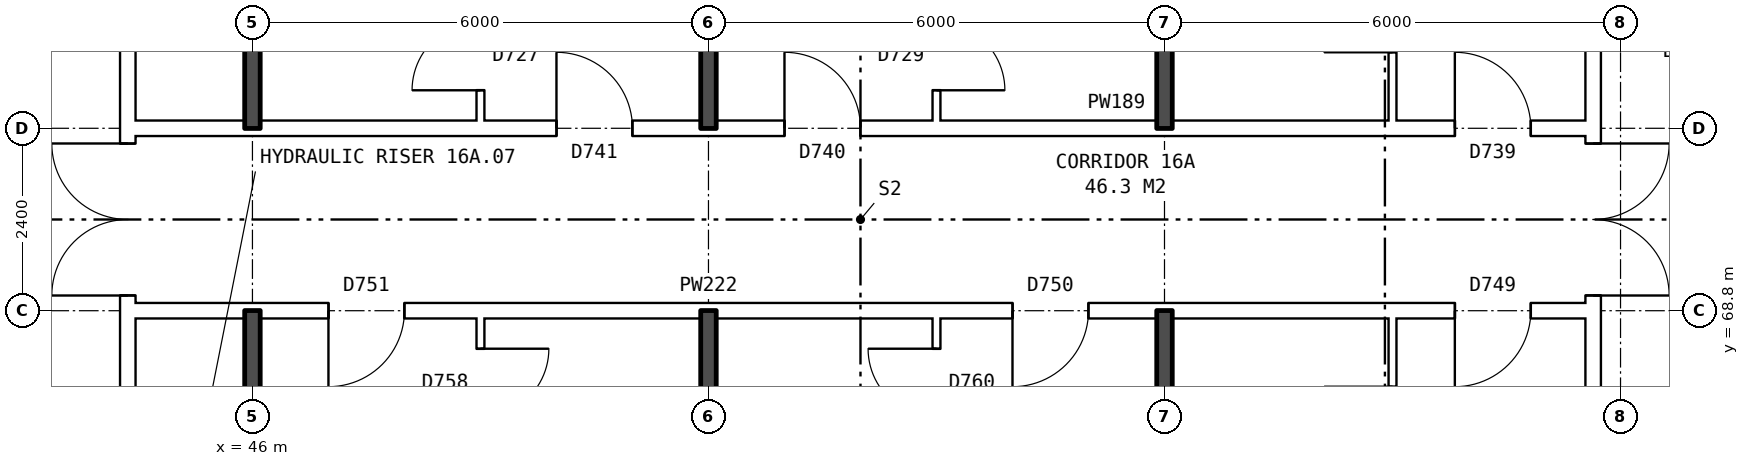
"""IFC4 building model, lengths in metres.
Left out: names, types, materials, properties, quantities, classifications, styles, units other than length and angle.
Written with IfcOpenShell. Run it as: python <this file> out.ifc"""

import sys

from ifc_helpers import new_model, si_unit, direction, frame, frame_2d, origin, place, context, subcontext, project, spatial, rectangle, extrude, element, fill, save


model = new_model("IFC4")
c1 = context("Model", 3, precision=1e-05, world=origin(), true_north=direction((0.0, 1.0)))
c2 = subcontext(c1, "Body", "Model", "MODEL_VIEW")
j1 = project(units=[si_unit("LENGTHUNIT", "METRE"), si_unit("PLANEANGLEUNIT", "RADIAN")], contexts=[c1])
p1 = place(None, origin())
s1 = spatial("IfcSite", under=j1, at=p1, CompositionType="ELEMENT")
p2 = place(p1, origin())
s2 = spatial("IfcBuilding", under=s1, at=p2, CompositionType="ELEMENT")
p3 = place(p2, frame((0.0, 0.0, 59.8)))
s3 = spatial("IfcBuildingStorey", under=s2, at=p3, CompositionType="ELEMENT", Elevation=59.8)
p4 = place(p3, frame((63.64, 63.9, 0.0), z_axis=(0.0, 0.0, 1.0), x_axis=(0.0, 1.0, 0.0)))
e1 = element("IfcWall", 1, at=p4, inside=s3, PredefinedType="PARTITIONING", context=c2, shape_type="SweptSolid", body=[
    extrude(rectangle(XDim=12.2, YDim=0.2, at=frame_2d((6.1, 0.0))), origin(), (0.0, 0.0, 1.0), 2.85),
])
p5 = place(p4, frame((5.1, 0.0, 0.0)))
e2 = element("IfcOpeningElement", 2, at=p5, cuts=e1, PredefinedType="OPENING", context=c2, shape_type="SweptSolid", body=[
    extrude(rectangle(XDim=2.0, YDim=2.1, at=frame_2d((1.0, 1.05))), frame((0.0, 0.11, 0.0), z_axis=(0.0, -1.0, 0.0), x_axis=(1.0, 0.0, 0.0)), (0.0, 0.0, 1.0), 0.22),
])
p6 = place(p3, frame((44.36, 63.9, 0.0), z_axis=(0.0, 0.0, 1.0), x_axis=(0.0, 1.0, 0.0)))
e3 = element("IfcWall", 3, at=p6, inside=s3, PredefinedType="PARTITIONING", context=c2, shape_type="SweptSolid", body=[
    extrude(rectangle(XDim=12.2, YDim=0.2, at=frame_2d((6.1, 0.0))), origin(), (0.0, 0.0, 1.0), 2.85),
])
p7 = place(p6, frame((5.1, 0.0, 0.0)))
e4 = element("IfcOpeningElement", 4, at=p7, cuts=e3, PredefinedType="OPENING", context=c2, shape_type="SweptSolid", body=[
    extrude(rectangle(XDim=2.0, YDim=2.1, at=frame_2d((1.0, 1.05))), frame((0.0, 0.11, 0.0), z_axis=(0.0, -1.0, 0.0), x_axis=(1.0, 0.0, 0.0)), (0.0, 0.0, 1.0), 0.22),
])
p8 = place(p3, frame((44.36, 68.8, 0.0), z_axis=(0.0, 0.0, 1.0), x_axis=(1.0, 0.0, 0.0)))
e5 = element("IfcWall", 5, at=p8, inside=s3, PredefinedType="PARTITIONING", context=c2, shape_type="SweptSolid", body=[
    extrude(rectangle(XDim=19.28, YDim=0.2, at=frame_2d((9.64, 0.0))), origin(), (0.0, 0.0, 1.0), 2.85),
])
p9 = place(p8, frame((17.46, 0.0, 0.0)))
e6 = element("IfcOpeningElement", 6, at=p9, cuts=e5, PredefinedType="OPENING", context=c2, shape_type="SweptSolid", body=[
    extrude(rectangle(XDim=1.0, YDim=2.1, at=frame_2d((0.5, 1.05))), frame((0.0, 0.11, 0.0), z_axis=(0.0, -1.0, 0.0), x_axis=(1.0, 0.0, 0.0)), (0.0, 0.0, 1.0), 0.22),
])
p10 = place(p8, frame((11.64, 0.0, 0.0)))
e7 = element("IfcOpeningElement", 7, at=p10, cuts=e5, PredefinedType="OPENING", context=c2, shape_type="SweptSolid", body=[
    extrude(rectangle(XDim=1.0, YDim=2.1, at=frame_2d((0.5, 1.05))), frame((0.0, 0.11, 0.0), z_axis=(0.0, -1.0, 0.0), x_axis=(1.0, 0.0, 0.0)), (0.0, 0.0, 1.0), 0.22),
])
p11 = place(p8, frame((2.64, 0.0, 0.0)))
e8 = element("IfcOpeningElement", 8, at=p11, cuts=e5, PredefinedType="OPENING", context=c2, shape_type="SweptSolid", body=[
    extrude(rectangle(XDim=1.0, YDim=2.1, at=frame_2d((0.5, 1.05))), frame((0.0, 0.11, 0.0), z_axis=(0.0, -1.0, 0.0), x_axis=(1.0, 0.0, 0.0)), (0.0, 0.0, 1.0), 0.22),
])
p12 = place(p3, frame((44.36, 71.2, 0.0), z_axis=(0.0, 0.0, 1.0), x_axis=(1.0, 0.0, 0.0)))
e9 = element("IfcWall", 9, at=p12, inside=s3, PredefinedType="PARTITIONING", context=c2, shape_type="SweptSolid", body=[
    extrude(rectangle(XDim=19.28, YDim=0.2, at=frame_2d((9.64, 0.0))), origin(), (0.0, 0.0, 1.0), 2.85),
])
p13 = place(p12, frame((17.46, 0.0, 0.0)))
e10 = element("IfcOpeningElement", 10, at=p13, cuts=e9, PredefinedType="OPENING", context=c2, shape_type="SweptSolid", body=[
    extrude(rectangle(XDim=1.0, YDim=2.1, at=frame_2d((0.5, 1.05))), frame((0.0, 0.11, 0.0), z_axis=(0.0, -1.0, 0.0), x_axis=(1.0, 0.0, 0.0)), (0.0, 0.0, 1.0), 0.22),
])
p14 = place(p12, frame((8.64, 0.0, 0.0)))
e11 = element("IfcOpeningElement", 11, at=p14, cuts=e9, PredefinedType="OPENING", context=c2, shape_type="SweptSolid", body=[
    extrude(rectangle(XDim=1.0, YDim=2.1, at=frame_2d((0.5, 1.05))), frame((0.0, 0.11, 0.0), z_axis=(0.0, -1.0, 0.0), x_axis=(1.0, 0.0, 0.0)), (0.0, 0.0, 1.0), 0.22),
])
p15 = place(p12, frame((5.64, 0.0, 0.0)))
e12 = element("IfcOpeningElement", 12, at=p15, cuts=e9, PredefinedType="OPENING", context=c2, shape_type="SweptSolid", body=[
    extrude(rectangle(XDim=1.0, YDim=2.1, at=frame_2d((0.5, 1.05))), frame((0.0, 0.11, 0.0), z_axis=(0.0, -1.0, 0.0), x_axis=(1.0, 0.0, 0.0)), (0.0, 0.0, 1.0), 0.22),
])
for number, where, z_axis, x_axis in (
    (13, (46.0, 63.8, 0.0), (0.0, 0.0, 1.0), (0.0, 1.0, 0.0)),
    (14, (46.0, 71.2, 0.0), (0.0, 0.0, 1.0), (0.0, 1.0, 0.0)),
):
    element("IfcWall", number, at=place(p3, frame(where, z_axis=z_axis, x_axis=x_axis)), inside=s3, PredefinedType="SOLIDWALL", context=c2, shape_type="SweptSolid", body=[
        extrude(rectangle(XDim=5.0, YDim=0.2, at=frame_2d((2.5, 0.0))), origin(), (0.0, 0.0, 1.0), 2.85),
    ])
p16 = place(p3, frame((49.0, 54.36, 0.0), z_axis=(0.0, 0.0, 1.0), x_axis=(0.0, 1.0, 0.0)))
e15 = element("IfcWall", 15, at=p16, inside=s3, PredefinedType="PARTITIONING", context=c2, shape_type="SweptSolid", body=[
    extrude(rectangle(XDim=14.34, YDim=0.1, at=frame_2d((7.17, 0.0))), origin(), (0.0, 0.0, 1.0), 2.85),
])
p17 = place(p16, frame((5.5, 0.0, 0.0)))
e16 = element("IfcOpeningElement", 16, at=p17, cuts=e15, PredefinedType="OPENING", context=c2, shape_type="SweptSolid", body=[
    extrude(rectangle(XDim=0.9, YDim=2.1, at=frame_2d((0.45, 1.05))), frame((0.0, 0.06, 0.0), z_axis=(0.0, -1.0, 0.0), x_axis=(1.0, 0.0, 0.0)), (0.0, 0.0, 1.0), 0.12),
])
p18 = place(p16, frame((13.04, 0.0, 0.0)))
e17 = element("IfcOpeningElement", 17, at=p18, cuts=e15, PredefinedType="OPENING", context=c2, shape_type="SweptSolid", body=[
    extrude(rectangle(XDim=0.9, YDim=2.1, at=frame_2d((0.45, 1.05))), frame((0.0, 0.06, 0.0), z_axis=(0.0, -1.0, 0.0), x_axis=(1.0, 0.0, 0.0)), (0.0, 0.0, 1.0), 0.12),
])
p19 = place(p3, frame((49.0, 71.3, 0.0), z_axis=(0.0, 0.0, 1.0), x_axis=(0.0, 1.0, 0.0)))
e18 = element("IfcWall", 18, at=p19, inside=s3, PredefinedType="PARTITIONING", context=c2, shape_type="SweptSolid", body=[
    extrude(rectangle(XDim=14.34, YDim=0.1, at=frame_2d((7.17, 0.0))), origin(), (0.0, 0.0, 1.0), 2.85),
])
p20 = place(p19, frame((6.74, 0.0, 0.0)))
e19 = element("IfcOpeningElement", 19, at=p20, cuts=e18, PredefinedType="OPENING", context=c2, shape_type="SweptSolid", body=[
    extrude(rectangle(XDim=0.9, YDim=2.1, at=frame_2d((0.45, 1.05))), frame((0.0, 0.06, 0.0), z_axis=(0.0, -1.0, 0.0), x_axis=(1.0, 0.0, 0.0)), (0.0, 0.0, 1.0), 0.12),
])
p21 = place(p19, frame((0.4, 0.0, 0.0)))
e20 = element("IfcOpeningElement", 20, at=p21, cuts=e18, PredefinedType="OPENING", context=c2, shape_type="SweptSolid", body=[
    extrude(rectangle(XDim=0.9, YDim=2.1, at=frame_2d((0.45, 1.05))), frame((0.0, 0.06, 0.0), z_axis=(0.0, -1.0, 0.0), x_axis=(1.0, 0.0, 0.0)), (0.0, 0.0, 1.0), 0.12),
])
for number, where, z_axis, x_axis in (
    (21, (52.0, 54.36, 0.0), (0.0, 0.0, 1.0), (0.0, 1.0, 0.0)),
    (22, (52.0, 71.2, 0.0), (0.0, 0.0, 1.0), (0.0, 1.0, 0.0)),
):
    element("IfcWall", number, at=place(p3, frame(where, z_axis=z_axis, x_axis=x_axis)), inside=s3, PredefinedType="SOLIDWALL", context=c2, shape_type="SweptSolid", body=[
        extrude(rectangle(XDim=14.44, YDim=0.2, at=frame_2d((7.22, 0.0))), origin(), (0.0, 0.0, 1.0), 2.85),
    ])
p22 = place(p3, frame((55.0, 54.36, 0.0), z_axis=(0.0, 0.0, 1.0), x_axis=(0.0, 1.0, 0.0)))
e23 = element("IfcWall", 23, at=p22, inside=s3, PredefinedType="PARTITIONING", context=c2, shape_type="SweptSolid", body=[
    extrude(rectangle(XDim=14.34, YDim=0.1, at=frame_2d((7.17, 0.0))), origin(), (0.0, 0.0, 1.0), 2.85),
])
p23 = place(p22, frame((7.7, 0.0, 0.0)))
e24 = element("IfcOpeningElement", 24, at=p23, cuts=e23, PredefinedType="OPENING", context=c2, shape_type="SweptSolid", body=[
    extrude(rectangle(XDim=0.9, YDim=2.1, at=frame_2d((0.45, 1.05))), frame((0.0, 0.06, 0.0), z_axis=(0.0, -1.0, 0.0), x_axis=(1.0, 0.0, 0.0)), (0.0, 0.0, 1.0), 0.12),
])
p24 = place(p22, frame((13.04, 0.0, 0.0)))
e25 = element("IfcOpeningElement", 25, at=p24, cuts=e23, PredefinedType="OPENING", context=c2, shape_type="SweptSolid", body=[
    extrude(rectangle(XDim=0.9, YDim=2.1, at=frame_2d((0.45, 1.05))), frame((0.0, 0.06, 0.0), z_axis=(0.0, -1.0, 0.0), x_axis=(1.0, 0.0, 0.0)), (0.0, 0.0, 1.0), 0.12),
])
p25 = place(p3, frame((55.0, 71.3, 0.0), z_axis=(0.0, 0.0, 1.0), x_axis=(0.0, 1.0, 0.0)))
e26 = element("IfcWall", 26, at=p25, inside=s3, PredefinedType="PARTITIONING", context=c2, shape_type="SweptSolid", body=[
    extrude(rectangle(XDim=14.34, YDim=0.1, at=frame_2d((7.17, 0.0))), origin(), (0.0, 0.0, 1.0), 2.85),
])
p26 = place(p25, frame((7.94, 0.0, 0.0)))
e27 = element("IfcOpeningElement", 27, at=p26, cuts=e26, PredefinedType="OPENING", context=c2, shape_type="SweptSolid", body=[
    extrude(rectangle(XDim=0.9, YDim=2.1, at=frame_2d((0.45, 1.05))), frame((0.0, 0.06, 0.0), z_axis=(0.0, -1.0, 0.0), x_axis=(1.0, 0.0, 0.0)), (0.0, 0.0, 1.0), 0.12),
])
p27 = place(p25, frame((0.4, 0.0, 0.0)))
e28 = element("IfcOpeningElement", 28, at=p27, cuts=e26, PredefinedType="OPENING", context=c2, shape_type="SweptSolid", body=[
    extrude(rectangle(XDim=0.9, YDim=2.1, at=frame_2d((0.45, 1.05))), frame((0.0, 0.06, 0.0), z_axis=(0.0, -1.0, 0.0), x_axis=(1.0, 0.0, 0.0)), (0.0, 0.0, 1.0), 0.12),
])
for number, where, z_axis, x_axis in (
    (29, (58.0, 54.36, 0.0), (0.0, 0.0, 1.0), (0.0, 1.0, 0.0)),
    (30, (58.0, 71.2, 0.0), (0.0, 0.0, 1.0), (0.0, 1.0, 0.0)),
):
    element("IfcWall", number, at=place(p3, frame(where, z_axis=z_axis, x_axis=x_axis)), inside=s3, PredefinedType="SOLIDWALL", context=c2, shape_type="SweptSolid", body=[
        extrude(rectangle(XDim=14.44, YDim=0.2, at=frame_2d((7.22, 0.0))), origin(), (0.0, 0.0, 1.0), 2.85),
    ])
p28 = place(p3, frame((61.0, 54.36, 0.0), z_axis=(0.0, 0.0, 1.0), x_axis=(0.0, 1.0, 0.0)))
e31 = element("IfcWall", 31, at=p28, inside=s3, PredefinedType="PARTITIONING", context=c2, shape_type="SweptSolid", body=[
    extrude(rectangle(XDim=14.34, YDim=0.1, at=frame_2d((7.17, 0.0))), origin(), (0.0, 0.0, 1.0), 2.85),
])
p29 = place(p28, frame((5.5, 0.0, 0.0)))
e32 = element("IfcOpeningElement", 32, at=p29, cuts=e31, PredefinedType="OPENING", context=c2, shape_type="SweptSolid", body=[
    extrude(rectangle(XDim=0.9, YDim=2.1, at=frame_2d((0.45, 1.05))), frame((0.0, 0.06, 0.0), z_axis=(0.0, -1.0, 0.0), x_axis=(1.0, 0.0, 0.0)), (0.0, 0.0, 1.0), 0.12),
])
p30 = place(p28, frame((12.54, 0.0, 0.0)))
e33 = element("IfcOpeningElement", 33, at=p30, cuts=e31, PredefinedType="OPENING", context=c2, shape_type="SweptSolid", body=[
    extrude(rectangle(XDim=0.9, YDim=2.1, at=frame_2d((0.45, 1.05))), frame((0.0, 0.06, 0.0), z_axis=(0.0, -1.0, 0.0), x_axis=(1.0, 0.0, 0.0)), (0.0, 0.0, 1.0), 0.12),
])
p31 = place(p3, frame((61.0, 71.3, 0.0), z_axis=(0.0, 0.0, 1.0), x_axis=(0.0, 1.0, 0.0)))
e34 = element("IfcWall", 34, at=p31, inside=s3, PredefinedType="PARTITIONING", context=c2, shape_type="SweptSolid", body=[
    extrude(rectangle(XDim=14.34, YDim=0.1, at=frame_2d((7.17, 0.0))), origin(), (0.0, 0.0, 1.0), 2.85),
])
p32 = place(p31, frame((9.24, 0.0, 0.0)))
e35 = element("IfcOpeningElement", 35, at=p32, cuts=e34, PredefinedType="OPENING", context=c2, shape_type="SweptSolid", body=[
    extrude(rectangle(XDim=0.9, YDim=2.1, at=frame_2d((0.45, 1.05))), frame((0.0, 0.06, 0.0), z_axis=(0.0, -1.0, 0.0), x_axis=(1.0, 0.0, 0.0)), (0.0, 0.0, 1.0), 0.12),
])
p33 = place(p31, frame((0.9, 0.0, 0.0)))
e36 = element("IfcOpeningElement", 36, at=p33, cuts=e34, PredefinedType="OPENING", context=c2, shape_type="SweptSolid", body=[
    extrude(rectangle(XDim=0.9, YDim=2.1, at=frame_2d((0.45, 1.05))), frame((0.0, 0.06, 0.0), z_axis=(0.0, -1.0, 0.0), x_axis=(1.0, 0.0, 0.0)), (0.0, 0.0, 1.0), 0.12),
])
p34 = place(p5, frame((2.0, 0.0, 0.0), z_axis=(0.0, 0.0, 1.0), x_axis=(-1.0, 0.0, 0.0)))
e37 = element("IfcDoor", 37, at=p34, inside=s3, OperationType="DOUBLE_DOOR_SINGLE_SWING", PredefinedType="DOOR", context=c2, shape_type="SweptSolid", body=[
    extrude(rectangle(XDim=2.0, YDim=2.1, at=frame_2d((1.0, 1.05))), frame((0.0, 0.025, 0.0), z_axis=(0.0, -1.0, 0.0), x_axis=(1.0, 0.0, 0.0)), (0.0, 0.0, 1.0), 0.05),
])
fill(e2, e37)
p35 = place(p7, origin())
e38 = element("IfcDoor", 38, at=p35, inside=s3, OperationType="DOUBLE_DOOR_SINGLE_SWING", PredefinedType="DOOR", context=c2, shape_type="SweptSolid", body=[
    extrude(rectangle(XDim=2.0, YDim=2.1, at=frame_2d((1.0, 1.05))), frame((0.0, 0.025, 0.0), z_axis=(0.0, -1.0, 0.0), x_axis=(1.0, 0.0, 0.0)), (0.0, 0.0, 1.0), 0.05),
])
fill(e4, e38)
p36 = place(p9, frame((1.0, 0.0, 0.0), z_axis=(0.0, 0.0, 1.0), x_axis=(-1.0, 0.0, 0.0)))
e39 = element("IfcDoor", 39, at=p36, inside=s3, OperationType="SINGLE_SWING_RIGHT", PredefinedType="DOOR", context=c2, shape_type="SweptSolid", body=[
    extrude(rectangle(XDim=1.0, YDim=2.1, at=frame_2d((0.5, 1.05))), frame((0.0, 0.025, 0.0), z_axis=(0.0, -1.0, 0.0), x_axis=(1.0, 0.0, 0.0)), (0.0, 0.0, 1.0), 0.05),
])
fill(e6, e39)
p37 = place(p10, frame((1.0, 0.0, 0.0), z_axis=(0.0, 0.0, 1.0), x_axis=(-1.0, 0.0, 0.0)))
e40 = element("IfcDoor", 40, at=p37, inside=s3, OperationType="SINGLE_SWING_RIGHT", PredefinedType="DOOR", context=c2, shape_type="SweptSolid", body=[
    extrude(rectangle(XDim=1.0, YDim=2.1, at=frame_2d((0.5, 1.05))), frame((0.0, 0.025, 0.0), z_axis=(0.0, -1.0, 0.0), x_axis=(1.0, 0.0, 0.0)), (0.0, 0.0, 1.0), 0.05),
])
fill(e7, e40)
p38 = place(p24, origin())
e41 = element("IfcDoor", 41, at=p38, inside=s3, OperationType="SINGLE_SWING_RIGHT", PredefinedType="DOOR", context=c2, shape_type="SweptSolid", body=[
    extrude(rectangle(XDim=0.9, YDim=2.1, at=frame_2d((0.45, 1.05))), frame((0.0, 0.025, 0.0), z_axis=(0.0, -1.0, 0.0), x_axis=(1.0, 0.0, 0.0)), (0.0, 0.0, 1.0), 0.05),
])
fill(e25, e41)
p39 = place(p11, frame((1.0, 0.0, 0.0), z_axis=(0.0, 0.0, 1.0), x_axis=(-1.0, 0.0, 0.0)))
e42 = element("IfcDoor", 42, at=p39, inside=s3, OperationType="SINGLE_SWING_RIGHT", PredefinedType="DOOR", context=c2, shape_type="SweptSolid", body=[
    extrude(rectangle(XDim=1.0, YDim=2.1, at=frame_2d((0.5, 1.05))), frame((0.0, 0.025, 0.0), z_axis=(0.0, -1.0, 0.0), x_axis=(1.0, 0.0, 0.0)), (0.0, 0.0, 1.0), 0.05),
])
fill(e8, e42)
p40 = place(p18, frame((0.9, 0.0, 0.0), z_axis=(0.0, 0.0, 1.0), x_axis=(-1.0, 0.0, 0.0)))
e43 = element("IfcDoor", 43, at=p40, inside=s3, OperationType="SINGLE_SWING_LEFT", PredefinedType="DOOR", context=c2, shape_type="SweptSolid", body=[
    extrude(rectangle(XDim=0.9, YDim=2.1, at=frame_2d((0.45, 1.05))), frame((0.0, 0.025, 0.0), z_axis=(0.0, -1.0, 0.0), x_axis=(1.0, 0.0, 0.0)), (0.0, 0.0, 1.0), 0.05),
])
fill(e17, e43)
p41 = place(p13, origin())
e44 = element("IfcDoor", 44, at=p41, inside=s3, OperationType="SINGLE_SWING_LEFT", PredefinedType="DOOR", context=c2, shape_type="SweptSolid", body=[
    extrude(rectangle(XDim=1.0, YDim=2.1, at=frame_2d((0.5, 1.05))), frame((0.0, 0.025, 0.0), z_axis=(0.0, -1.0, 0.0), x_axis=(1.0, 0.0, 0.0)), (0.0, 0.0, 1.0), 0.05),
])
fill(e10, e44)
p42 = place(p14, origin())
e45 = element("IfcDoor", 45, at=p42, inside=s3, OperationType="SINGLE_SWING_LEFT", PredefinedType="DOOR", context=c2, shape_type="SweptSolid", body=[
    extrude(rectangle(XDim=1.0, YDim=2.1, at=frame_2d((0.5, 1.05))), frame((0.0, 0.025, 0.0), z_axis=(0.0, -1.0, 0.0), x_axis=(1.0, 0.0, 0.0)), (0.0, 0.0, 1.0), 0.05),
])
fill(e11, e45)
p43 = place(p27, frame((0.9, 0.0, 0.0), z_axis=(0.0, 0.0, 1.0), x_axis=(-1.0, 0.0, 0.0)))
e46 = element("IfcDoor", 46, at=p43, inside=s3, OperationType="SINGLE_SWING_RIGHT", PredefinedType="DOOR", context=c2, shape_type="SweptSolid", body=[
    extrude(rectangle(XDim=0.9, YDim=2.1, at=frame_2d((0.45, 1.05))), frame((0.0, 0.025, 0.0), z_axis=(0.0, -1.0, 0.0), x_axis=(1.0, 0.0, 0.0)), (0.0, 0.0, 1.0), 0.05),
])
fill(e28, e46)
p44 = place(p15, origin())
e47 = element("IfcDoor", 47, at=p44, inside=s3, OperationType="SINGLE_SWING_LEFT", PredefinedType="DOOR", context=c2, shape_type="SweptSolid", body=[
    extrude(rectangle(XDim=1.0, YDim=2.1, at=frame_2d((0.5, 1.05))), frame((0.0, 0.025, 0.0), z_axis=(0.0, -1.0, 0.0), x_axis=(1.0, 0.0, 0.0)), (0.0, 0.0, 1.0), 0.05),
])
fill(e12, e47)
p45 = place(p21, origin())
e48 = element("IfcDoor", 48, at=p45, inside=s3, OperationType="SINGLE_SWING_LEFT", PredefinedType="DOOR", context=c2, shape_type="SweptSolid", body=[
    extrude(rectangle(XDim=0.9, YDim=2.1, at=frame_2d((0.45, 1.05))), frame((0.0, 0.025, 0.0), z_axis=(0.0, -1.0, 0.0), x_axis=(1.0, 0.0, 0.0)), (0.0, 0.0, 1.0), 0.05),
])
fill(e20, e48)
save(model, sys.argv[1])
